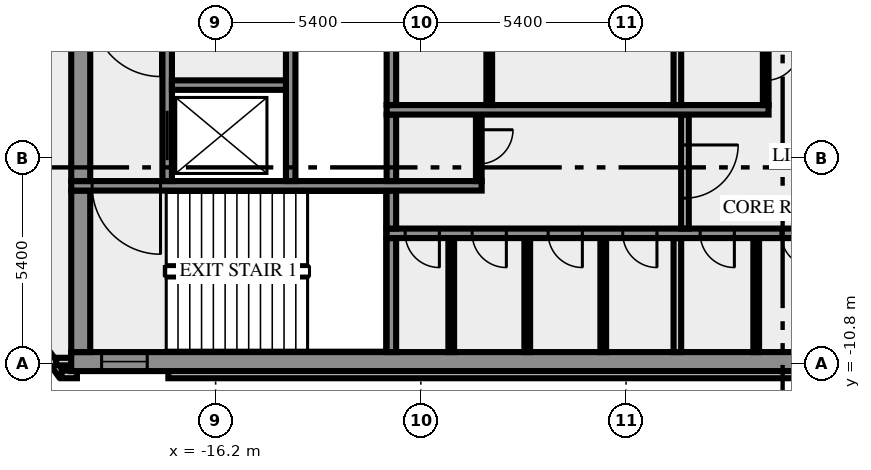
"""IFC4 building model, lengths in metres.
Left out: names, types, materials, properties, quantities, classifications, styles, units other than length and angle.
Written with IfcOpenShell. Run it as: python <this file> out.ifc"""

import sys

from ifc_helpers import new_model, si_unit, direction, frame, frame_2d, origin, place, context, subcontext, project, spatial, rectangle, extrude, element, fill, save


model = new_model("IFC4")
c1 = context("Model", 3, precision=1e-05, world=origin(), true_north=direction((0.0, 1.0)))
c2 = subcontext(c1, "Body", "Model", "MODEL_VIEW")
j1 = project(units=[si_unit("LENGTHUNIT", "METRE"), si_unit("PLANEANGLEUNIT", "RADIAN")], contexts=[c1])
p1 = place(None, origin())
s1 = spatial("IfcSite", under=j1, at=p1, CompositionType="ELEMENT")
p2 = place(p1, origin())
s2 = spatial("IfcBuilding", under=s1, at=p2, CompositionType="ELEMENT")
p3 = place(p2, frame((0.0, 0.0, 194.0)))
s3 = spatial("IfcBuildingStorey", under=s2, at=p3, CompositionType="ELEMENT", Elevation=194.0)
p4 = place(p3, frame((-21.833, -8.909, 0.0), z_axis=(0.0, 0.0, 1.0), x_axis=(0.587766567315, -0.809030569476, 0.0)))
e1 = element("IfcWall", 1, at=p4, inside=s3, PredefinedType="SOLIDWALL", context=c2, shape_type="SweptSolid", body=[
    extrude(rectangle(XDim=2.688, YDim=0.2, at=frame_2d((1.344, 0.0))), origin(), (0.0, 0.0, 1.0), 3.65),
])
p5 = place(p3, frame((-20.256, -11.088, 0.0), z_axis=(0.0, 0.0, 1.0), x_axis=(1.0, 0.0, 0.0)))
e2 = element("IfcWall", 2, at=p5, inside=s3, PredefinedType="SOLIDWALL", context=c2, shape_type="SweptSolid", body=[
    extrude(rectangle(XDim=0.406, YDim=0.2, at=frame_2d((0.203, 0.0))), origin(), (0.0, 0.0, 1.0), 3.65),
])
p6 = place(p3, frame((-17.444, -11.088, 0.0), z_axis=(0.0, 0.0, 1.0), x_axis=(1.0, 0.0, 0.0)))
e3 = element("IfcWall", 3, at=p6, inside=s3, PredefinedType="SOLIDWALL", context=c2, shape_type="SweptSolid", body=[
    extrude(rectangle(XDim=34.888, YDim=0.2, at=frame_2d((17.444, 0.0))), origin(), (0.0, 0.0, 1.0), 3.65),
])
p7 = place(p3, frame((-19.98, -10.75, 0.0), z_axis=(0.0, 0.0, 1.0), x_axis=(-1.0, 0.0, 0.0)))
e4 = element("IfcWall", 4, at=p7, inside=s3, PredefinedType="SOLIDWALL", context=c2, shape_type="SweptSolid", body=[
    extrude(rectangle(XDim=0.417, YDim=0.2, at=frame_2d((0.208, 0.0))), origin(), (0.0, 0.0, 1.0), 3.65),
])
p8 = place(p3, frame((-20.0, -10.75, 0.0), z_axis=(0.0, 0.0, 1.0), x_axis=(1.0, 0.0, 0.0)))
e5 = element("IfcWall", 5, at=p8, inside=s3, PredefinedType="SHEAR", context=c2, shape_type="SweptSolid", body=[
    extrude(rectangle(XDim=40.0, YDim=0.5, at=frame_2d((20.0, 0.0))), origin(), (0.0, 0.0, 1.0), 3.65),
])
p9 = place(p8, frame((0.8, 0.0, 1.0)))
e6 = element("IfcOpeningElement", 6, at=p9, cuts=e5, PredefinedType="OPENING", context=c2, shape_type="SweptSolid", body=[
    extrude(rectangle(XDim=1.2, YDim=1.2, at=frame_2d((0.6, 0.6))), frame((0.0, 0.26, 0.0), z_axis=(0.0, -1.0, 0.0), x_axis=(1.0, 0.0, 0.0)), (0.0, 0.0, 1.0), 0.52),
])
p10 = place(p8, frame((38.0, 0.0, 1.0)))
e7 = element("IfcOpeningElement", 7, at=p10, cuts=e5, PredefinedType="OPENING", context=c2, shape_type="SweptSolid", body=[
    extrude(rectangle(XDim=1.2, YDim=1.2, at=frame_2d((0.6, 0.6))), frame((0.0, 0.26, 0.0), z_axis=(0.0, -1.0, 0.0), x_axis=(1.0, 0.0, 0.0)), (0.0, 0.0, 1.0), 0.52),
])
p11 = place(p3, frame((-19.75, -10.5, 0.0), z_axis=(0.0, 0.0, 1.0), x_axis=(0.0, 1.0, 0.0)))
e8 = element("IfcWall", 8, at=p11, inside=s3, PredefinedType="SHEAR", context=c2, shape_type="SweptSolid", body=[
    extrude(rectangle(XDim=4.25, YDim=0.5, at=frame_2d((2.125, 0.0))), origin(), (0.0, 0.0, 1.0), 3.65),
])
p12 = place(p3, frame((-11.575, -10.5, 0.0), z_axis=(0.0, 0.0, 1.0), x_axis=(0.0, 1.0, 0.0)))
e9 = element("IfcWall", 9, at=p12, inside=s3, PredefinedType="SHEAR", context=c2, shape_type="SweptSolid", body=[
    extrude(rectangle(XDim=3.0, YDim=0.25, at=frame_2d((1.5, 0.0))), origin(), (0.0, 0.0, 1.0), 3.65),
])
for number, where, z_axis, x_axis in (
    (10, (-10.0, -10.5, 0.0), (0.0, 0.0, 1.0), (0.0, 1.0, 0.0)),
    (11, (-8.0, -10.5, 0.0), (0.0, 0.0, 1.0), (0.0, 1.0, 0.0)),
    (12, (-6.0, -10.5, 0.0), (0.0, 0.0, 1.0), (0.0, 1.0, 0.0)),
):
    element("IfcWall", number, at=place(p3, frame(where, z_axis=z_axis, x_axis=x_axis)), inside=s3, PredefinedType="PARTITIONING", context=c2, shape_type="SweptSolid", body=[
        extrude(rectangle(XDim=3.0, YDim=0.15, at=frame_2d((1.5, 0.0))), origin(), (0.0, 0.0, 1.0), 3.65),
    ])
p13 = place(p3, frame((-4.05, -10.5, 0.0), z_axis=(0.0, 0.0, 1.0), x_axis=(0.0, 1.0, 0.0)))
e13 = element("IfcWall", 13, at=p13, inside=s3, PredefinedType="SOLIDWALL", context=c2, shape_type="SweptSolid", body=[
    extrude(rectangle(XDim=3.0, YDim=0.2, at=frame_2d((1.5, 0.0))), origin(), (0.0, 0.0, 1.0), 3.65),
])
p14 = place(p3, frame((-1.975, -10.5, 0.0), z_axis=(0.0, 0.0, 1.0), x_axis=(0.0, 1.0, 0.0)))
e14 = element("IfcWall", 14, at=p14, inside=s3, PredefinedType="PARTITIONING", context=c2, shape_type="SweptSolid", body=[
    extrude(rectangle(XDim=3.0, YDim=0.15, at=frame_2d((1.5, 0.0))), origin(), (0.0, 0.0, 1.0), 3.65),
])
p15 = place(p3, frame((11.7, -7.375, 0.0), z_axis=(0.0, 0.0, 1.0), x_axis=(-1.0, 0.0, 0.0)))
e15 = element("IfcWall", 15, at=p15, inside=s3, PredefinedType="SHEAR", context=c2, shape_type="SweptSolid", body=[
    extrude(rectangle(XDim=23.4, YDim=0.25, at=frame_2d((11.7, 0.0))), origin(), (0.0, 0.0, 1.0), 3.65),
])
p16 = place(p15, frame((22.012, 0.0, 0.0)))
e16 = element("IfcOpeningElement", 16, at=p16, cuts=e15, PredefinedType="OPENING", context=c2, shape_type="SweptSolid", body=[
    extrude(rectangle(XDim=0.9, YDim=2.1, at=frame_2d((0.45, 1.05))), frame((0.0, 0.135, 0.0), z_axis=(0.0, -1.0, 0.0), x_axis=(1.0, 0.0, 0.0)), (0.0, 0.0, 1.0), 0.27),
])
p17 = place(p15, frame((20.25, 0.0, 0.0)))
e17 = element("IfcOpeningElement", 17, at=p17, cuts=e15, PredefinedType="OPENING", context=c2, shape_type="SweptSolid", body=[
    extrude(rectangle(XDim=0.9, YDim=2.1, at=frame_2d((0.45, 1.05))), frame((0.0, 0.135, 0.0), z_axis=(0.0, -1.0, 0.0), x_axis=(1.0, 0.0, 0.0)), (0.0, 0.0, 1.0), 0.27),
])
p18 = place(p15, frame((18.25, 0.0, 0.0)))
e18 = element("IfcOpeningElement", 18, at=p18, cuts=e15, PredefinedType="OPENING", context=c2, shape_type="SweptSolid", body=[
    extrude(rectangle(XDim=0.9, YDim=2.1, at=frame_2d((0.45, 1.05))), frame((0.0, 0.135, 0.0), z_axis=(0.0, -1.0, 0.0), x_axis=(1.0, 0.0, 0.0)), (0.0, 0.0, 1.0), 0.27),
])
p19 = place(p15, frame((16.287, 0.0, 0.0)))
e19 = element("IfcOpeningElement", 19, at=p19, cuts=e15, PredefinedType="OPENING", context=c2, shape_type="SweptSolid", body=[
    extrude(rectangle(XDim=0.9, YDim=2.1, at=frame_2d((0.45, 1.05))), frame((0.0, 0.135, 0.0), z_axis=(0.0, -1.0, 0.0), x_axis=(1.0, 0.0, 0.0)), (0.0, 0.0, 1.0), 0.27),
])
p20 = place(p15, frame((14.25, 0.0, 0.0)))
e20 = element("IfcOpeningElement", 20, at=p20, cuts=e15, PredefinedType="OPENING", context=c2, shape_type="SweptSolid", body=[
    extrude(rectangle(XDim=0.9, YDim=2.1, at=frame_2d((0.45, 1.05))), frame((0.0, 0.135, 0.0), z_axis=(0.0, -1.0, 0.0), x_axis=(1.0, 0.0, 0.0)), (0.0, 0.0, 1.0), 0.27),
])
p21 = place(p15, frame((12.125, 0.0, 0.0)))
e21 = element("IfcOpeningElement", 21, at=p21, cuts=e15, PredefinedType="OPENING", context=c2, shape_type="SweptSolid", body=[
    extrude(rectangle(XDim=0.9, YDim=2.1, at=frame_2d((0.45, 1.05))), frame((0.0, 0.135, 0.0), z_axis=(0.0, -1.0, 0.0), x_axis=(1.0, 0.0, 0.0)), (0.0, 0.0, 1.0), 0.27),
])
p22 = place(p15, frame((10.45, 0.0, 0.0)))
e22 = element("IfcOpeningElement", 22, at=p22, cuts=e15, PredefinedType="OPENING", context=c2, shape_type="SweptSolid", body=[
    extrude(rectangle(XDim=0.75, YDim=2.1, at=frame_2d((0.375, 1.05))), frame((0.0, 0.135, 0.0), z_axis=(0.0, -1.0, 0.0), x_axis=(1.0, 0.0, 0.0)), (0.0, 0.0, 1.0), 0.27),
])
p23 = place(p15, frame((8.35, 0.0, 0.0)))
e23 = element("IfcOpeningElement", 23, at=p23, cuts=e15, PredefinedType="OPENING", context=c2, shape_type="SweptSolid", body=[
    extrude(rectangle(XDim=1.1, YDim=2.1, at=frame_2d((0.55, 1.05))), frame((0.0, 0.135, 0.0), z_axis=(0.0, -1.0, 0.0), x_axis=(1.0, 0.0, 0.0)), (0.0, 0.0, 1.0), 0.27),
])
p24 = place(p15, frame((5.85, 0.0, 0.0)))
e24 = element("IfcOpeningElement", 24, at=p24, cuts=e15, PredefinedType="OPENING", context=c2, shape_type="SweptSolid", body=[
    extrude(rectangle(XDim=1.1, YDim=2.1, at=frame_2d((0.55, 1.05))), frame((0.0, 0.135, 0.0), z_axis=(0.0, -1.0, 0.0), x_axis=(1.0, 0.0, 0.0)), (0.0, 0.0, 1.0), 0.27),
])
p25 = place(p15, frame((3.35, 0.0, 0.0)))
e25 = element("IfcOpeningElement", 25, at=p25, cuts=e15, PredefinedType="OPENING", context=c2, shape_type="SweptSolid", body=[
    extrude(rectangle(XDim=1.1, YDim=2.1, at=frame_2d((0.55, 1.05))), frame((0.0, 0.135, 0.0), z_axis=(0.0, -1.0, 0.0), x_axis=(1.0, 0.0, 0.0)), (0.0, 0.0, 1.0), 0.27),
])
p26 = place(p15, frame((0.85, 0.0, 0.0)))
e26 = element("IfcOpeningElement", 26, at=p26, cuts=e15, PredefinedType="OPENING", context=c2, shape_type="SweptSolid", body=[
    extrude(rectangle(XDim=1.1, YDim=2.1, at=frame_2d((0.55, 1.05))), frame((0.0, 0.135, 0.0), z_axis=(0.0, -1.0, 0.0), x_axis=(1.0, 0.0, 0.0)), (0.0, 0.0, 1.0), 0.27),
])
p27 = place(p3, frame((-11.575, -7.25, 0.0), z_axis=(0.0, 0.0, 1.0), x_axis=(0.0, 1.0, 0.0)))
e27 = element("IfcWall", 27, at=p27, inside=s3, PredefinedType="SHEAR", context=c2, shape_type="SweptSolid", body=[
    extrude(rectangle(XDim=1.0, YDim=0.25, at=frame_2d((0.5, 0.0))), origin(), (0.0, 0.0, 1.0), 3.65),
])
p28 = place(p3, frame((-3.85, -4.25, 0.0), z_axis=(0.0, 0.0, 1.0), x_axis=(0.0, -1.0, 0.0)))
e28 = element("IfcWall", 28, at=p28, inside=s3, PredefinedType="SOLIDWALL", context=c2, shape_type="SweptSolid", body=[
    extrude(rectangle(XDim=3.0, YDim=0.2, at=frame_2d((1.5, 0.0))), origin(), (0.0, 0.0, 1.0), 3.65),
])
p29 = place(p28, frame((0.8, 0.0, 0.0)))
e29 = element("IfcOpeningElement", 29, at=p29, cuts=e28, PredefinedType="OPENING", context=c2, shape_type="SweptSolid", body=[
    extrude(rectangle(XDim=1.4, YDim=2.1, at=frame_2d((0.7, 1.05))), frame((0.0, 0.11, 0.0), z_axis=(0.0, -1.0, 0.0), x_axis=(1.0, 0.0, 0.0)), (0.0, 0.0, 1.0), 0.22),
])
p30 = place(p3, frame((-9.2, -6.125, 0.0), z_axis=(0.0, 0.0, 1.0), x_axis=(-1.0, 0.0, 0.0)))
e30 = element("IfcWall", 30, at=p30, inside=s3, PredefinedType="SHEAR", context=c2, shape_type="SweptSolid", body=[
    extrude(rectangle(XDim=10.8, YDim=0.25, at=frame_2d((5.4, 0.0))), origin(), (0.0, 0.0, 1.0), 3.65),
])
p31 = place(p30, frame((8.45, 0.0, 0.0)))
e31 = element("IfcOpeningElement", 31, at=p31, cuts=e30, PredefinedType="OPENING", context=c2, shape_type="SweptSolid", body=[
    extrude(rectangle(XDim=1.8, YDim=2.1, at=frame_2d((0.9, 1.05))), frame((0.0, 0.135, 0.0), z_axis=(0.0, -1.0, 0.0), x_axis=(1.0, 0.0, 0.0)), (0.0, 0.0, 1.0), 0.27),
])
p32 = place(p3, frame((-19.75, -6.0, 0.0), z_axis=(0.0, 0.0, 1.0), x_axis=(0.0, 1.0, 0.0)))
e32 = element("IfcWall", 32, at=p32, inside=s3, PredefinedType="SHEAR", context=c2, shape_type="SweptSolid", body=[
    extrude(rectangle(XDim=4.3, YDim=0.5, at=frame_2d((2.15, 0.0))), origin(), (0.0, 0.0, 1.0), 3.65),
])
p33 = place(p3, frame((-17.475, -6.0, 0.0), z_axis=(0.0, 0.0, 1.0), x_axis=(0.0, 1.0, 0.0)))
e33 = element("IfcWall", 33, at=p33, inside=s3, PredefinedType="SHEAR", context=c2, shape_type="SweptSolid", body=[
    extrude(rectangle(XDim=4.3, YDim=0.25, at=frame_2d((2.15, 0.0))), origin(), (0.0, 0.0, 1.0), 3.65),
])
p34 = place(p33, frame((0.55, 0.0, 0.0)))
e34 = element("IfcOpeningElement", 34, at=p34, cuts=e33, PredefinedType="OPENING", context=c2, shape_type="SweptSolid", body=[
    extrude(rectangle(XDim=1.3, YDim=2.1, at=frame_2d((0.65, 1.05))), frame((0.0, 0.135, 0.0), z_axis=(0.0, -1.0, 0.0), x_axis=(1.0, 0.0, 0.0)), (0.0, 0.0, 1.0), 0.27),
])
p35 = place(p3, frame((-14.225, -6.0, 0.0), z_axis=(0.0, 0.0, 1.0), x_axis=(0.0, 1.0, 0.0)))
e35 = element("IfcWall", 35, at=p35, inside=s3, PredefinedType="SHEAR", context=c2, shape_type="SweptSolid", body=[
    extrude(rectangle(XDim=4.3, YDim=0.25, at=frame_2d((2.15, 0.0))), origin(), (0.0, 0.0, 1.0), 3.65),
])
p36 = place(p3, frame((-11.575, -6.0, 0.0), z_axis=(0.0, 0.0, 1.0), x_axis=(0.0, 1.0, 0.0)))
e36 = element("IfcWall", 36, at=p36, inside=s3, PredefinedType="SHEAR", context=c2, shape_type="SweptSolid", body=[
    extrude(rectangle(XDim=1.75, YDim=0.25, at=frame_2d((0.875, 0.0))), origin(), (0.0, 0.0, 1.0), 3.65),
])
p37 = place(p3, frame((-9.275, -4.25, 0.0), z_axis=(0.0, 0.0, 1.0), x_axis=(0.0, -1.0, 0.0)))
e37 = element("IfcWall", 37, at=p37, inside=s3, PredefinedType="PARTITIONING", context=c2, shape_type="SweptSolid", body=[
    extrude(rectangle(XDim=1.75, YDim=0.15, at=frame_2d((0.875, 0.0))), origin(), (0.0, 0.0, 1.0), 3.65),
])
p38 = place(p37, frame((0.4, 0.0, 0.0)))
e38 = element("IfcOpeningElement", 38, at=p38, cuts=e37, PredefinedType="OPENING", context=c2, shape_type="SweptSolid", body=[
    extrude(rectangle(XDim=0.9, YDim=2.1, at=frame_2d((0.45, 1.05))), frame((0.0, 0.085, 0.0), z_axis=(0.0, -1.0, 0.0), x_axis=(1.0, 0.0, 0.0)), (0.0, 0.0, 1.0), 0.17),
])
p39 = place(p3, frame((-11.7, -4.125, 0.0), z_axis=(0.0, 0.0, 1.0), x_axis=(1.0, 0.0, 0.0)))
e39 = element("IfcWall", 39, at=p39, inside=s3, PredefinedType="SHEAR", context=c2, shape_type="SweptSolid", body=[
    extrude(rectangle(XDim=10.05, YDim=0.25, at=frame_2d((5.025, 0.0))), origin(), (0.0, 0.0, 1.0), 3.65),
])
p40 = place(p3, frame((-11.575, -4.0, 0.0), z_axis=(0.0, 0.0, 1.0), x_axis=(0.0, 1.0, 0.0)))
e40 = element("IfcWall", 40, at=p40, inside=s3, PredefinedType="SHEAR", context=c2, shape_type="SweptSolid", body=[
    extrude(rectangle(XDim=2.3, YDim=0.25, at=frame_2d((1.15, 0.0))), origin(), (0.0, 0.0, 1.0), 3.65),
])
p41 = place(p3, frame((-9.0, -4.0, 0.0), z_axis=(0.0, 0.0, 1.0), x_axis=(0.0, 1.0, 0.0)))
e41 = element("IfcWall", 41, at=p41, inside=s3, PredefinedType="PARTITIONING", context=c2, shape_type="SweptSolid", body=[
    extrude(rectangle(XDim=2.3, YDim=0.15, at=frame_2d((1.15, 0.0))), origin(), (0.0, 0.0, 1.0), 3.65),
])
p42 = place(p3, frame((-4.05, -4.0, 0.0), z_axis=(0.0, 0.0, 1.0), x_axis=(0.0, 1.0, 0.0)))
e42 = element("IfcWall", 42, at=p42, inside=s3, PredefinedType="SOLIDWALL", context=c2, shape_type="SweptSolid", body=[
    extrude(rectangle(XDim=2.3, YDim=0.2, at=frame_2d((1.15, 0.0))), origin(), (0.0, 0.0, 1.0), 3.65),
])
p43 = place(p3, frame((-1.725, -1.7, 0.0), z_axis=(0.0, 0.0, 1.0), x_axis=(0.0, -1.0, 0.0)))
e43 = element("IfcWall", 43, at=p43, inside=s3, PredefinedType="PARTITIONING", context=c2, shape_type="SweptSolid", body=[
    extrude(rectangle(XDim=2.3, YDim=0.15, at=frame_2d((1.15, 0.0))), origin(), (0.0, 0.0, 1.0), 3.65),
])
p44 = place(p43, frame((0.75, 0.0, 0.0)))
e44 = element("IfcOpeningElement", 44, at=p44, cuts=e43, PredefinedType="OPENING", context=c2, shape_type="SweptSolid", body=[
    extrude(rectangle(XDim=0.9, YDim=2.1, at=frame_2d((0.45, 1.05))), frame((0.0, 0.085, 0.0), z_axis=(0.0, -1.0, 0.0), x_axis=(1.0, 0.0, 0.0)), (0.0, 0.0, 1.0), 0.17),
])
p45 = place(p3, frame((-17.35, -3.475, 0.0), z_axis=(0.0, 0.0, 1.0), x_axis=(1.0, 0.0, 0.0)))
e45 = element("IfcWall", 45, at=p45, inside=s3, PredefinedType="SHEAR", context=c2, shape_type="SweptSolid", body=[
    extrude(rectangle(XDim=3.0, YDim=0.25, at=frame_2d((1.5, 0.0))), origin(), (0.0, 0.0, 1.0), 3.65),
])
p46 = place(p9, origin())
e46 = element("IfcWindow", 46, at=p46, inside=s3, PartitioningType="SINGLE_PANEL", PredefinedType="WINDOW", context=c2, shape_type="SweptSolid", body=[
    extrude(rectangle(XDim=1.2, YDim=1.2, at=frame_2d((0.6, 0.6))), frame((0.0, 0.03, 0.0), z_axis=(0.0, -1.0, 0.0), x_axis=(1.0, 0.0, 0.0)), (0.0, 0.0, 1.0), 0.06),
])
fill(e6, e46)
p47 = place(p16, origin())
e47 = element("IfcDoor", 47, at=p47, inside=s3, OperationType="SINGLE_SWING_RIGHT", PredefinedType="DOOR", context=c2, shape_type="SweptSolid", body=[
    extrude(rectangle(XDim=0.9, YDim=2.1, at=frame_2d((0.45, 1.05))), frame((0.0, 0.025, 0.0), z_axis=(0.0, -1.0, 0.0), x_axis=(1.0, 0.0, 0.0)), (0.0, 0.0, 1.0), 0.05),
])
fill(e16, e47)
p48 = place(p17, origin())
e48 = element("IfcDoor", 48, at=p48, inside=s3, OperationType="SINGLE_SWING_RIGHT", PredefinedType="DOOR", context=c2, shape_type="SweptSolid", body=[
    extrude(rectangle(XDim=0.9, YDim=2.1, at=frame_2d((0.45, 1.05))), frame((0.0, 0.025, 0.0), z_axis=(0.0, -1.0, 0.0), x_axis=(1.0, 0.0, 0.0)), (0.0, 0.0, 1.0), 0.05),
])
fill(e17, e48)
p49 = place(p18, origin())
e49 = element("IfcDoor", 49, at=p49, inside=s3, OperationType="SINGLE_SWING_RIGHT", PredefinedType="DOOR", context=c2, shape_type="SweptSolid", body=[
    extrude(rectangle(XDim=0.9, YDim=2.1, at=frame_2d((0.45, 1.05))), frame((0.0, 0.025, 0.0), z_axis=(0.0, -1.0, 0.0), x_axis=(1.0, 0.0, 0.0)), (0.0, 0.0, 1.0), 0.05),
])
fill(e18, e49)
p50 = place(p19, origin())
e50 = element("IfcDoor", 50, at=p50, inside=s3, OperationType="SINGLE_SWING_RIGHT", PredefinedType="DOOR", context=c2, shape_type="SweptSolid", body=[
    extrude(rectangle(XDim=0.9, YDim=2.1, at=frame_2d((0.45, 1.05))), frame((0.0, 0.025, 0.0), z_axis=(0.0, -1.0, 0.0), x_axis=(1.0, 0.0, 0.0)), (0.0, 0.0, 1.0), 0.05),
])
fill(e19, e50)
p51 = place(p20, origin())
e51 = element("IfcDoor", 51, at=p51, inside=s3, OperationType="SINGLE_SWING_RIGHT", PredefinedType="DOOR", context=c2, shape_type="SweptSolid", body=[
    extrude(rectangle(XDim=0.9, YDim=2.1, at=frame_2d((0.45, 1.05))), frame((0.0, 0.025, 0.0), z_axis=(0.0, -1.0, 0.0), x_axis=(1.0, 0.0, 0.0)), (0.0, 0.0, 1.0), 0.05),
])
fill(e20, e51)
p52 = place(p21, origin())
e52 = element("IfcDoor", 52, at=p52, inside=s3, OperationType="SINGLE_SWING_RIGHT", PredefinedType="DOOR", context=c2, shape_type="SweptSolid", body=[
    extrude(rectangle(XDim=0.9, YDim=2.1, at=frame_2d((0.45, 1.05))), frame((0.0, 0.025, 0.0), z_axis=(0.0, -1.0, 0.0), x_axis=(1.0, 0.0, 0.0)), (0.0, 0.0, 1.0), 0.05),
])
fill(e21, e52)
p53 = place(p29, origin())
e53 = element("IfcDoor", 53, at=p53, inside=s3, OperationType="DOUBLE_DOOR_SINGLE_SWING", PredefinedType="DOOR", context=c2, shape_type="SweptSolid", body=[
    extrude(rectangle(XDim=1.4, YDim=2.1, at=frame_2d((0.7, 1.05))), frame((0.0, 0.025, 0.0), z_axis=(0.0, -1.0, 0.0), x_axis=(1.0, 0.0, 0.0)), (0.0, 0.0, 1.0), 0.05),
])
fill(e29, e53)
p54 = place(p31, origin())
e54 = element("IfcDoor", 54, at=p54, inside=s3, OperationType="DOUBLE_DOOR_SINGLE_SWING", PredefinedType="DOOR", context=c2, shape_type="SweptSolid", body=[
    extrude(rectangle(XDim=1.8, YDim=2.1, at=frame_2d((0.9, 1.05))), frame((0.0, 0.025, 0.0), z_axis=(0.0, -1.0, 0.0), x_axis=(1.0, 0.0, 0.0)), (0.0, 0.0, 1.0), 0.05),
])
fill(e31, e54)
p55 = place(p34, origin())
e55 = element("IfcDoor", 55, at=p55, inside=s3, OperationType="DOUBLE_DOOR_SLIDING", PredefinedType="DOOR", context=c2, shape_type="SweptSolid", body=[
    extrude(rectangle(XDim=1.3, YDim=2.1, at=frame_2d((0.65, 1.05))), frame((0.0, 0.025, 0.0), z_axis=(0.0, -1.0, 0.0), x_axis=(1.0, 0.0, 0.0)), (0.0, 0.0, 1.0), 0.05),
])
fill(e34, e55)
p56 = place(p38, origin())
e56 = element("IfcDoor", 56, at=p56, inside=s3, OperationType="SINGLE_SWING_LEFT", PredefinedType="DOOR", context=c2, shape_type="SweptSolid", body=[
    extrude(rectangle(XDim=0.9, YDim=2.1, at=frame_2d((0.45, 1.05))), frame((0.0, 0.025, 0.0), z_axis=(0.0, -1.0, 0.0), x_axis=(1.0, 0.0, 0.0)), (0.0, 0.0, 1.0), 0.05),
])
fill(e38, e56)
p57 = place(p44, origin())
e57 = element("IfcDoor", 57, at=p57, inside=s3, OperationType="SINGLE_SWING_RIGHT", PredefinedType="DOOR", context=c2, shape_type="SweptSolid", body=[
    extrude(rectangle(XDim=0.9, YDim=2.1, at=frame_2d((0.45, 1.05))), frame((0.0, 0.025, 0.0), z_axis=(0.0, -1.0, 0.0), x_axis=(1.0, 0.0, 0.0)), (0.0, 0.0, 1.0), 0.05),
])
fill(e44, e57)
save(model, sys.argv[1])
